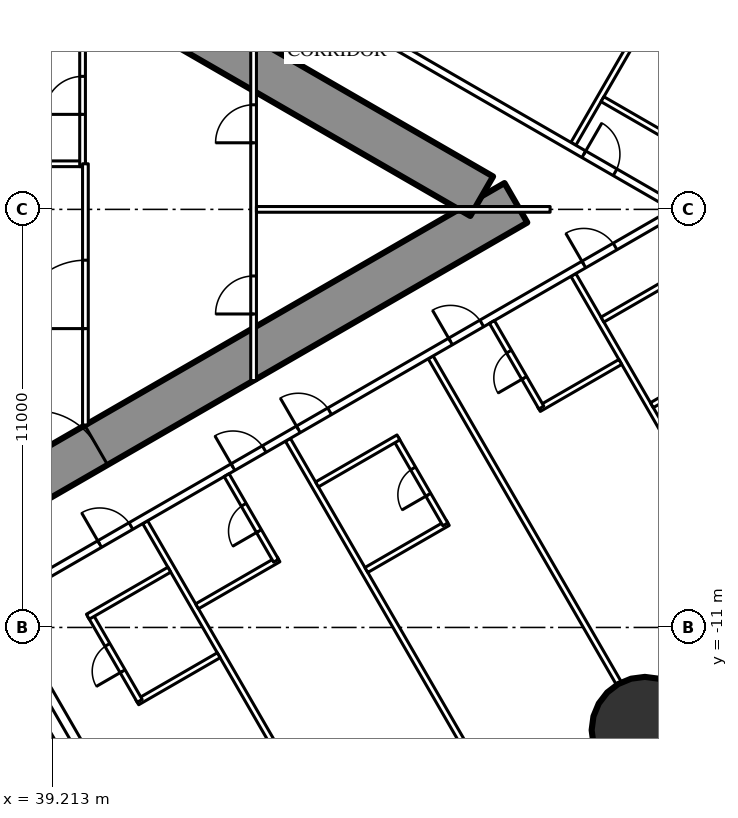
"""IFC4 building model, lengths in metres.
Left out: names, types, materials, properties, quantities, classifications, styles, units other than length and angle.
Written with IfcOpenShell. Run it as: python <this file> out.ifc"""

import sys

from ifc_helpers import new_model, si_unit, direction, frame, frame_2d, origin, origin_2d, place, context, subcontext, project, spatial, rectangle, hollow_circle, extrude, element, fill, save


model = new_model("IFC4")
c1 = context("Model", 3, precision=1e-05, world=origin(), true_north=direction((0.0, 1.0)))
c2 = subcontext(c1, "Body", "Model", "MODEL_VIEW")
j1 = project(units=[si_unit("LENGTHUNIT", "METRE"), si_unit("PLANEANGLEUNIT", "RADIAN")], contexts=[c1])
p1 = place(None, origin())
s1 = spatial("IfcSite", under=j1, at=p1, CompositionType="ELEMENT")
p2 = place(p1, origin())
s2 = spatial("IfcBuilding", under=s1, at=p2, CompositionType="ELEMENT")
p3 = place(p2, frame((0.0, 0.0, 63.5)))
s3 = spatial("IfcBuildingStorey", under=s2, at=p3, CompositionType="ELEMENT", Elevation=63.5)
p4 = place(p3, frame((54.795, -13.701, 0.0), z_axis=(0.0, 0.0, 1.0), x_axis=(1.0, 0.0, 0.0)))
e1 = element("IfcColumn", 1, at=p4, inside=s3, PredefinedType="COLUMN", context=c2, shape_type="SweptSolid", body=[
    extrude(hollow_circle(Radius=1.4, WallThickness=0.12, at=origin_2d()), origin(), (0.0, 0.0, 1.0), 3.5),
])
p5 = place(p3, frame((27.2, -13.8, 0.0), z_axis=(0.0, 0.0, 1.0), x_axis=(0.866027159892, 0.499996958321, 0.0)))
e2 = element("IfcWall", 2, at=p5, inside=s3, PredefinedType="SHEAR", context=c2, shape_type="SweptSolid", body=[
    extrude(rectangle(XDim=27.947, YDim=1.2, at=frame_2d((13.973, 0.0))), origin(), (0.0, 0.0, 1.0), 3.5),
])
p6 = place(p5, frame((4.6, 0.0, 0.0)))
e3 = element("IfcOpeningElement", 3, at=p6, cuts=e2, PredefinedType="OPENING", context=c2, shape_type="SweptSolid", body=[
    extrude(rectangle(XDim=1.0, YDim=2.2, at=frame_2d((0.5, 1.1))), frame((0.0, 0.61, 0.0), z_axis=(0.0, -1.0, 0.0), x_axis=(1.0, 0.0, 0.0)), (0.0, 0.0, 1.0), 1.22),
])
p7 = place(p5, frame((13.395, 0.0, 0.0)))
e4 = element("IfcOpeningElement", 4, at=p7, cuts=e2, PredefinedType="OPENING", context=c2, shape_type="SweptSolid", body=[
    extrude(rectangle(XDim=1.8, YDim=2.2, at=frame_2d((0.9, 1.1))), frame((0.0, 0.61, 0.0), z_axis=(0.0, -1.0, 0.0), x_axis=(1.0, 0.0, 0.0)), (0.0, 0.0, 1.0), 1.22),
])
p8 = place(p3, frame((27.2, 13.8, 0.0), z_axis=(0.0, 0.0, 1.0), x_axis=(0.866024515034, -0.500001539357, 0.0)))
e5 = element("IfcWall", 5, at=p8, inside=s3, PredefinedType="SHEAR", context=c2, shape_type="SweptSolid", body=[
    extrude(rectangle(XDim=26.907, YDim=1.2, at=frame_2d((13.454, 0.0))), origin(), (0.0, 0.0, 1.0), 3.5),
])
p9 = place(p8, frame((4.6, 0.0, 0.0)))
e6 = element("IfcOpeningElement", 6, at=p9, cuts=e5, PredefinedType="OPENING", context=c2, shape_type="SweptSolid", body=[
    extrude(rectangle(XDim=1.0, YDim=2.2, at=frame_2d((0.5, 1.1))), frame((0.0, 0.61, 0.0), z_axis=(0.0, -1.0, 0.0), x_axis=(1.0, 0.0, 0.0)), (0.0, 0.0, 1.0), 1.22),
])
p10 = place(p8, frame((13.395, 0.0, 0.0)))
e7 = element("IfcOpeningElement", 7, at=p10, cuts=e5, PredefinedType="OPENING", context=c2, shape_type="SweptSolid", body=[
    extrude(rectangle(XDim=1.8, YDim=2.2, at=frame_2d((0.9, 1.1))), frame((0.0, 0.61, 0.0), z_axis=(0.0, -1.0, 0.0), x_axis=(1.0, 0.0, 0.0)), (0.0, 0.0, 1.0), 1.22),
])
p11 = place(p3, frame((41.647, -8.23, 0.0), z_axis=(0.0, 0.0, 1.0), x_axis=(0.49998590462, -0.866033541603, 0.0)))
e8 = element("IfcWall", 8, at=p11, inside=s3, PredefinedType="PARTITIONING", context=c2, shape_type="SweptSolid", body=[
    extrude(rectangle(XDim=12.621, YDim=0.15, at=frame_2d((6.311, 0.0))), origin(), (0.0, 0.0, 1.0), 3.25),
])
p12 = place(p3, frame((45.403, -6.062, 0.0), z_axis=(0.0, 0.0, 1.0), x_axis=(0.500007077968, -0.866021317279, 0.0)))
e9 = element("IfcWall", 9, at=p12, inside=s3, PredefinedType="PARTITIONING", context=c2, shape_type="SweptSolid", body=[
    extrude(rectangle(XDim=12.721, YDim=0.15, at=frame_2d((6.361, 0.0))), origin(), (0.0, 0.0, 1.0), 3.25),
])
p13 = place(p3, frame((49.159, -3.893, 0.0), z_axis=(0.0, 0.0, 1.0), x_axis=(0.499998773722, -0.866026111775, 0.0)))
e10 = element("IfcWall", 10, at=p13, inside=s3, PredefinedType="PARTITIONING", context=c2, shape_type="SweptSolid", body=[
    extrude(rectangle(XDim=9.892, YDim=0.15, at=frame_2d((4.946, 0.0))), origin(), (0.0, 0.0, 1.0), 2.25),
])
for number, where, z_axis, x_axis in (
    (11, (52.915, -1.725, 0.0), (0.0, 0.0, 1.0), (0.5, -0.866, 0.0)),
    (12, (52.915, 1.725, 0.0), (0.0, 0.0, 1.0), (0.5, 0.866, 0.0)),
):
    element("IfcWall", number, at=place(p3, frame(where, z_axis=z_axis, x_axis=x_axis)), inside=s3, PredefinedType="PARTITIONING", context=c2, shape_type="SweptSolid", body=[
        extrude(rectangle(XDim=12.591, YDim=0.15, at=frame_2d((6.295, 0.0))), origin(), (0.0, 0.0, 1.0), 3.25),
    ])
p14 = place(p3, frame((37.96, -10.243, 0.0), z_axis=(0.0, 0.0, 1.0), x_axis=(0.866026429433, 0.499998223521, 0.0)))
e13 = element("IfcWall", 13, at=p14, inside=s3, PredefinedType="PARTITIONING", context=c2, shape_type="SweptSolid", body=[
    extrude(rectangle(XDim=20.487, YDim=0.2, at=frame_2d((10.243, 0.0))), origin(), (0.0, 0.0, 1.0), 3.25),
])
p15 = place(p14, frame((6.925, 0.0, 0.0)))
e14 = element("IfcOpeningElement", 14, at=p15, cuts=e13, PredefinedType="OPENING", context=c2, shape_type="SweptSolid", body=[
    extrude(rectangle(XDim=0.95, YDim=2.2, at=frame_2d((0.475, 1.1))), frame((0.0, 0.11, 0.0), z_axis=(0.0, -1.0, 0.0), x_axis=(1.0, 0.0, 0.0)), (0.0, 0.0, 1.0), 0.22),
])
p16 = place(p14, frame((8.912, 0.0, 0.0)))
e15 = element("IfcOpeningElement", 15, at=p16, cuts=e13, PredefinedType="OPENING", context=c2, shape_type="SweptSolid", body=[
    extrude(rectangle(XDim=0.95, YDim=2.2, at=frame_2d((0.475, 1.1))), frame((0.0, 0.11, 0.0), z_axis=(0.0, -1.0, 0.0), x_axis=(1.0, 0.0, 0.0)), (0.0, 0.0, 1.0), 0.22),
])
p17 = place(p14, frame((13.535, 0.0, 0.0)))
e16 = element("IfcOpeningElement", 16, at=p17, cuts=e13, PredefinedType="OPENING", context=c2, shape_type="SweptSolid", body=[
    extrude(rectangle(XDim=0.95, YDim=2.2, at=frame_2d((0.475, 1.1))), frame((0.0, 0.11, 0.0), z_axis=(0.0, -1.0, 0.0), x_axis=(1.0, 0.0, 0.0)), (0.0, 0.0, 1.0), 0.22),
])
p18 = place(p14, frame((17.585, 0.0, 0.0)))
e17 = element("IfcOpeningElement", 17, at=p18, cuts=e13, PredefinedType="OPENING", context=c2, shape_type="SweptSolid", body=[
    extrude(rectangle(XDim=0.95, YDim=2.2, at=frame_2d((0.475, 1.1))), frame((0.0, 0.11, 0.0), z_axis=(0.0, -1.0, 0.0), x_axis=(1.0, 0.0, 0.0)), (0.0, 0.0, 1.0), 0.22),
])
p19 = place(p14, frame((2.875, 0.0, 0.0)))
e18 = element("IfcOpeningElement", 18, at=p19, cuts=e13, PredefinedType="OPENING", context=c2, shape_type="SweptSolid", body=[
    extrude(rectangle(XDim=0.95, YDim=2.2, at=frame_2d((0.475, 1.1))), frame((0.0, 0.11, 0.0), z_axis=(0.0, -1.0, 0.0), x_axis=(1.0, 0.0, 0.0)), (0.0, 0.0, 1.0), 0.22),
])
p20 = place(p3, frame((41.619, 8.131, 0.0), z_axis=(0.0, 0.0, 1.0), x_axis=(0.86603245327, -0.499987789734, 0.0)))
e19 = element("IfcWall", 19, at=p20, inside=s3, PredefinedType="PARTITIONING", context=c2, shape_type="SweptSolid", body=[
    extrude(rectangle(XDim=16.142, YDim=0.2, at=frame_2d((8.071, 0.0))), origin(), (0.0, 0.0, 1.0), 3.25),
])
p21 = place(p20, frame((13.36, 0.0, 0.0)))
e20 = element("IfcOpeningElement", 20, at=p21, cuts=e19, PredefinedType="OPENING", context=c2, shape_type="SweptSolid", body=[
    extrude(rectangle(XDim=0.95, YDim=2.2, at=frame_2d((0.475, 1.1))), frame((0.0, 0.11, 0.0), z_axis=(0.0, -1.0, 0.0), x_axis=(1.0, 0.0, 0.0)), (0.0, 0.0, 1.0), 0.22),
])
p22 = place(p20, frame((4.687, 0.0, 0.0)))
e21 = element("IfcOpeningElement", 21, at=p22, cuts=e19, PredefinedType="OPENING", context=c2, shape_type="SweptSolid", body=[
    extrude(rectangle(XDim=0.95, YDim=2.2, at=frame_2d((0.475, 1.1))), frame((0.0, 0.11, 0.0), z_axis=(0.0, -1.0, 0.0), x_axis=(1.0, 0.0, 0.0)), (0.0, 0.0, 1.0), 0.22),
])
p23 = place(p20, frame((2.987, 0.0, 0.0)))
e22 = element("IfcOpeningElement", 22, at=p23, cuts=e19, PredefinedType="OPENING", context=c2, shape_type="SweptSolid", body=[
    extrude(rectangle(XDim=0.95, YDim=2.2, at=frame_2d((0.475, 1.1))), frame((0.0, 0.11, 0.0), z_axis=(0.0, -1.0, 0.0), x_axis=(1.0, 0.0, 0.0)), (0.0, 0.0, 1.0), 0.22),
])
p24 = place(p3, frame((43.012, -10.444, 0.0), z_axis=(0.0, 0.0, 1.0), x_axis=(0.866031185235, 0.4999899861, 0.0)))
e23 = element("IfcWall", 23, at=p24, inside=s3, PredefinedType="PARTITIONING", context=c2, shape_type="SweptSolid", body=[
    extrude(rectangle(XDim=2.475, YDim=0.15, at=frame_2d((1.238, 0.0))), origin(), (0.0, 0.0, 1.0), 3.25),
])
p25 = place(p3, frame((43.791, -6.993, 0.0), z_axis=(0.0, 0.0, 1.0), x_axis=(0.500047596559, -0.865997922154, 0.0)))
e24 = element("IfcWall", 24, at=p25, inside=s3, PredefinedType="PARTITIONING", context=c2, shape_type="SweptSolid", body=[
    extrude(rectangle(XDim=2.6, YDim=0.15, at=frame_2d((1.3, 0.0))), origin(), (0.0, 0.0, 1.0), 3.25),
])
p26 = place(p25, frame((0.9, 0.0, 0.0)))
e25 = element("IfcOpeningElement", 25, at=p26, cuts=e24, PredefinedType="OPENING", context=c2, shape_type="SweptSolid", body=[
    extrude(rectangle(XDim=0.8, YDim=2.2, at=frame_2d((0.4, 1.1))), frame((0.0, 0.085, 0.0), z_axis=(0.0, -1.0, 0.0), x_axis=(1.0, 0.0, 0.0)), (0.0, 0.0, 1.0), 0.17),
])
p27 = place(p3, frame((47.468, -9.488, 0.0), z_axis=(0.0, 0.0, 1.0), x_axis=(0.86604923931, 0.499958713387, 0.0)))
e26 = element("IfcWall", 26, at=p27, inside=s3, PredefinedType="PARTITIONING", context=c2, shape_type="SweptSolid", body=[
    extrude(rectangle(XDim=2.475, YDim=0.15, at=frame_2d((1.237, 0.0))), origin(), (0.0, 0.0, 1.0), 3.25),
])
p28 = place(p3, frame((48.246, -6.037, 0.0), z_axis=(0.0, 0.0, 1.0), x_axis=(0.500006934395, -0.866021400173, 0.0)))
e27 = element("IfcWall", 27, at=p28, inside=s3, PredefinedType="PARTITIONING", context=c2, shape_type="SweptSolid", body=[
    extrude(rectangle(XDim=2.6, YDim=0.15, at=frame_2d((1.3, 0.0))), origin(), (0.0, 0.0, 1.0), 3.25),
])
p29 = place(p28, frame((0.9, 0.0, 0.0)))
e28 = element("IfcOpeningElement", 28, at=p29, cuts=e27, PredefinedType="OPENING", context=c2, shape_type="SweptSolid", body=[
    extrude(rectangle(XDim=0.8, YDim=2.2, at=frame_2d((0.4, 1.1))), frame((0.0, 0.085, 0.0), z_axis=(0.0, -1.0, 0.0), x_axis=(1.0, 0.0, 0.0)), (0.0, 0.0, 1.0), 0.17),
])
for number, where, z_axis, x_axis in (
    (29, (46.168, -7.237, 0.0), (0.0, 0.0, 1.0), (0.866, 0.5, 0.0)),
    (30, (52.006, -5.251, 0.0), (0.0, 0.0, 1.0), (0.866, 0.5, 0.0)),
):
    element("IfcWall", number, at=place(p3, frame(where, z_axis=z_axis, x_axis=x_axis)), inside=s3, PredefinedType="PARTITIONING", context=c2, shape_type="SweptSolid", body=[
        extrude(rectangle(XDim=2.475, YDim=0.15, at=frame_2d((1.237, 0.0))), origin(), (0.0, 0.0, 1.0), 3.25),
    ])
p30 = place(p3, frame((50.771, -2.962, 0.0), z_axis=(0.0, 0.0, 1.0), x_axis=(0.500006934395, -0.866021400173, 0.0)))
e31 = element("IfcWall", 31, at=p30, inside=s3, PredefinedType="PARTITIONING", context=c2, shape_type="SweptSolid", body=[
    extrude(rectangle(XDim=2.6, YDim=0.15, at=frame_2d((1.3, 0.0))), origin(), (0.0, 0.0, 1.0), 3.25),
])
p31 = place(p30, frame((0.9, 0.0, 0.0)))
e32 = element("IfcOpeningElement", 32, at=p31, cuts=e31, PredefinedType="OPENING", context=c2, shape_type="SweptSolid", body=[
    extrude(rectangle(XDim=0.8, YDim=2.2, at=frame_2d((0.4, 1.1))), frame((0.0, 0.085, 0.0), z_axis=(0.0, -1.0, 0.0), x_axis=(1.0, 0.0, 0.0)), (0.0, 0.0, 1.0), 0.17),
])
for number, where, z_axis, x_axis in (
    (33, (54.98, -5.151, 0.0), (0.0, 0.0, 1.0), (0.866, 0.5, 0.0)),
    (34, (53.68, -2.9, 0.0), (0.0, 0.0, 1.0), (0.866, 0.5, 0.0)),
    (35, (54.98, 5.151, 0.0), (0.0, 0.0, 1.0), (0.866, -0.5, 0.0)),
    (36, (53.68, 2.9, 0.0), (0.0, 0.0, 1.0), (0.866, -0.5, 0.0)),
):
    element("IfcWall", number, at=place(p3, frame(where, z_axis=z_axis, x_axis=x_axis)), inside=s3, PredefinedType="PARTITIONING", context=c2, shape_type="SweptSolid", body=[
        extrude(rectangle(XDim=2.475, YDim=0.15, at=frame_2d((1.237, 0.0))), origin(), (0.0, 0.0, 1.0), 3.25),
    ])
p32 = place(p3, frame((41.439, -12.969, 0.0), z_axis=(0.0, 0.0, 1.0), x_axis=(0.866031185235, 0.4999899861, 0.0)))
e37 = element("IfcWall", 37, at=p32, inside=s3, PredefinedType="PARTITIONING", context=c2, shape_type="SweptSolid", body=[
    extrude(rectangle(XDim=2.475, YDim=0.15, at=frame_2d((1.238, 0.0))), origin(), (0.0, 0.0, 1.0), 3.25),
])
p33 = place(p3, frame((40.204, -10.68, 0.0), z_axis=(0.0, 0.0, 1.0), x_axis=(0.500006934395, -0.866021400173, 0.0)))
e38 = element("IfcWall", 38, at=p33, inside=s3, PredefinedType="PARTITIONING", context=c2, shape_type="SweptSolid", body=[
    extrude(rectangle(XDim=2.6, YDim=0.15, at=frame_2d((1.3, 0.0))), origin(), (0.0, 0.0, 1.0), 3.25),
])
p34 = place(p33, frame((0.9, 0.0, 0.0)))
e39 = element("IfcOpeningElement", 39, at=p34, cuts=e38, PredefinedType="OPENING", context=c2, shape_type="SweptSolid", body=[
    extrude(rectangle(XDim=0.8, YDim=2.2, at=frame_2d((0.4, 1.1))), frame((0.0, 0.085, 0.0), z_axis=(0.0, -1.0, 0.0), x_axis=(1.0, 0.0, 0.0)), (0.0, 0.0, 1.0), 0.17),
])
p35 = place(p3, frame((40.139, -10.718, 0.0), z_axis=(0.0, 0.0, 1.0), x_axis=(0.866031185235, 0.4999899861, 0.0)))
e40 = element("IfcWall", 40, at=p35, inside=s3, PredefinedType="PARTITIONING", context=c2, shape_type="SweptSolid", body=[
    extrude(rectangle(XDim=2.475, YDim=0.15, at=frame_2d((1.238, 0.0))), origin(), (0.0, 0.0, 1.0), 3.25),
])
p36 = place(p3, frame((37.9, 1.2, 0.0), z_axis=(0.0, 0.0, 1.0), x_axis=(1.0, 0.0, 0.0)))
e41 = element("IfcWall", 41, at=p36, inside=s3, PredefinedType="PARTITIONING", context=c2, shape_type="SweptSolid", body=[
    extrude(rectangle(XDim=2.175, YDim=0.15, at=frame_2d((1.087, 0.0))), origin(), (0.0, 0.0, 1.0), 3.25),
])
p37 = place(p3, frame((40.0, 1.125, 0.0), z_axis=(0.0, 0.0, 1.0), x_axis=(0.0, 1.0, 0.0)))
e42 = element("IfcWall", 42, at=p37, inside=s3, PredefinedType="PARTITIONING", context=c2, shape_type="SweptSolid", body=[
    extrude(rectangle(XDim=3.75, YDim=0.15, at=frame_2d((1.875, 0.0))), origin(), (0.0, 0.0, 1.0), 3.25),
])
p38 = place(p37, frame((1.375, 0.0, 0.0)))
e43 = element("IfcOpeningElement", 43, at=p38, cuts=e42, PredefinedType="OPENING", context=c2, shape_type="SweptSolid", body=[
    extrude(rectangle(XDim=1.0, YDim=2.2, at=frame_2d((0.5, 1.1))), frame((0.0, 0.085, 0.0), z_axis=(0.0, -1.0, 0.0), x_axis=(1.0, 0.0, 0.0)), (0.0, 0.0, 1.0), 0.17),
])
p39 = place(p3, frame((40.075, -5.674, 0.0), z_axis=(0.0, 0.0, 1.0), x_axis=(0.0, 1.0, 0.0)))
e44 = element("IfcWall", 44, at=p39, inside=s3, PredefinedType="PARTITIONING", context=c2, shape_type="SweptSolid", body=[
    extrude(rectangle(XDim=6.874, YDim=0.15, at=frame_2d((3.437, 0.0))), origin(), (0.0, 0.0, 1.0), 3.25),
])
p40 = place(p39, frame((2.537, 0.0, 0.0)))
e45 = element("IfcOpeningElement", 45, at=p40, cuts=e44, PredefinedType="OPENING", context=c2, shape_type="SweptSolid", body=[
    extrude(rectangle(XDim=1.8, YDim=2.2, at=frame_2d((0.9, 1.1))), frame((0.0, 0.085, 0.0), z_axis=(0.0, -1.0, 0.0), x_axis=(1.0, 0.0, 0.0)), (0.0, 0.0, 1.0), 0.17),
])
p41 = place(p3, frame((44.5, -4.505, 0.0), z_axis=(0.0, 0.0, 1.0), x_axis=(0.0, 1.0, 0.0)))
e46 = element("IfcWall", 46, at=p41, inside=s3, PredefinedType="PARTITIONING", context=c2, shape_type="SweptSolid", body=[
    extrude(rectangle(XDim=9.009, YDim=0.15, at=frame_2d((4.505, 0.0))), origin(), (0.0, 0.0, 1.0), 2.45),
])
p42 = place(p41, frame((1.752, 0.0, 0.0)))
e47 = element("IfcOpeningElement", 47, at=p42, cuts=e46, PredefinedType="OPENING", context=c2, shape_type="SweptSolid", body=[
    extrude(rectangle(XDim=1.0, YDim=2.2, at=frame_2d((0.5, 1.1))), frame((0.0, 0.085, 0.0), z_axis=(0.0, -1.0, 0.0), x_axis=(1.0, 0.0, 0.0)), (0.0, 0.0, 1.0), 0.17),
])
p43 = place(p41, frame((6.257, 0.0, 0.0)))
e48 = element("IfcOpeningElement", 48, at=p43, cuts=e46, PredefinedType="OPENING", context=c2, shape_type="SweptSolid", body=[
    extrude(rectangle(XDim=1.0, YDim=2.2, at=frame_2d((0.5, 1.1))), frame((0.0, 0.085, 0.0), z_axis=(0.0, -1.0, 0.0), x_axis=(1.0, 0.0, 0.0)), (0.0, 0.0, 1.0), 0.17),
])
p44 = place(p3, frame((44.575, 0.0, 0.0), z_axis=(0.0, 0.0, 1.0), x_axis=(1.0, 0.0, 0.0)))
e49 = element("IfcWall", 49, at=p44, inside=s3, PredefinedType="PARTITIONING", context=c2, shape_type="SweptSolid", body=[
    extrude(rectangle(XDim=7.727, YDim=0.15, at=frame_2d((3.864, 0.0))), origin(), (0.0, 0.0, 1.0), 2.25),
])
p45 = place(p3, frame((38.673, -11.968, 0.0), z_axis=(0.0, 0.0, 1.0), x_axis=(0.499929347863, -0.866066190972, 0.0)))
e50 = element("IfcWall", 50, at=p45, inside=s3, PredefinedType="PARTITIONING", context=c2, shape_type="SweptSolid", body=[
    extrude(rectangle(XDim=3.201, YDim=0.25, at=frame_2d((1.6, 0.0))), origin(), (0.0, 0.0, 1.0), 3.25),
])
p46 = place(p26, origin())
e51 = element("IfcDoor", 51, at=p46, inside=s3, OperationType="SINGLE_SWING_RIGHT", PredefinedType="DOOR", context=c2, shape_type="SweptSolid", body=[
    extrude(rectangle(XDim=0.8, YDim=2.2, at=frame_2d((0.4, 1.1))), frame((0.0, 0.025, 0.0), z_axis=(0.0, -1.0, 0.0), x_axis=(1.0, 0.0, 0.0)), (0.0, 0.0, 1.0), 0.05),
])
fill(e25, e51)
p47 = place(p15, origin())
e52 = element("IfcDoor", 52, at=p47, inside=s3, OperationType="SINGLE_SWING_LEFT", PredefinedType="DOOR", context=c2, shape_type="SweptSolid", body=[
    extrude(rectangle(XDim=0.95, YDim=2.2, at=frame_2d((0.475, 1.1))), frame((0.0, 0.025, 0.0), z_axis=(0.0, -1.0, 0.0), x_axis=(1.0, 0.0, 0.0)), (0.0, 0.0, 1.0), 0.05),
])
fill(e14, e52)
p48 = place(p29, origin())
e53 = element("IfcDoor", 53, at=p48, inside=s3, OperationType="SINGLE_SWING_RIGHT", PredefinedType="DOOR", context=c2, shape_type="SweptSolid", body=[
    extrude(rectangle(XDim=0.8, YDim=2.2, at=frame_2d((0.4, 1.1))), frame((0.0, 0.025, 0.0), z_axis=(0.0, -1.0, 0.0), x_axis=(1.0, 0.0, 0.0)), (0.0, 0.0, 1.0), 0.05),
])
fill(e28, e53)
p49 = place(p16, origin())
e54 = element("IfcDoor", 54, at=p49, inside=s3, OperationType="SINGLE_SWING_LEFT", PredefinedType="DOOR", context=c2, shape_type="SweptSolid", body=[
    extrude(rectangle(XDim=0.95, YDim=2.2, at=frame_2d((0.475, 1.1))), frame((0.0, 0.025, 0.0), z_axis=(0.0, -1.0, 0.0), x_axis=(1.0, 0.0, 0.0)), (0.0, 0.0, 1.0), 0.05),
])
fill(e15, e54)
p50 = place(p31, origin())
e55 = element("IfcDoor", 55, at=p50, inside=s3, OperationType="SINGLE_SWING_RIGHT", PredefinedType="DOOR", context=c2, shape_type="SweptSolid", body=[
    extrude(rectangle(XDim=0.8, YDim=2.2, at=frame_2d((0.4, 1.1))), frame((0.0, 0.025, 0.0), z_axis=(0.0, -1.0, 0.0), x_axis=(1.0, 0.0, 0.0)), (0.0, 0.0, 1.0), 0.05),
])
fill(e32, e55)
p51 = place(p17, origin())
e56 = element("IfcDoor", 56, at=p51, inside=s3, OperationType="SINGLE_SWING_LEFT", PredefinedType="DOOR", context=c2, shape_type="SweptSolid", body=[
    extrude(rectangle(XDim=0.95, YDim=2.2, at=frame_2d((0.475, 1.1))), frame((0.0, 0.025, 0.0), z_axis=(0.0, -1.0, 0.0), x_axis=(1.0, 0.0, 0.0)), (0.0, 0.0, 1.0), 0.05),
])
fill(e16, e56)
p52 = place(p18, origin())
e57 = element("IfcDoor", 57, at=p52, inside=s3, OperationType="SINGLE_SWING_LEFT", PredefinedType="DOOR", context=c2, shape_type="SweptSolid", body=[
    extrude(rectangle(XDim=0.95, YDim=2.2, at=frame_2d((0.475, 1.1))), frame((0.0, 0.025, 0.0), z_axis=(0.0, -1.0, 0.0), x_axis=(1.0, 0.0, 0.0)), (0.0, 0.0, 1.0), 0.05),
])
fill(e17, e57)
p53 = place(p21, origin())
e58 = element("IfcDoor", 58, at=p53, inside=s3, OperationType="SINGLE_SWING_LEFT", PredefinedType="DOOR", context=c2, shape_type="SweptSolid", body=[
    extrude(rectangle(XDim=0.95, YDim=2.2, at=frame_2d((0.475, 1.1))), frame((0.0, 0.025, 0.0), z_axis=(0.0, -1.0, 0.0), x_axis=(1.0, 0.0, 0.0)), (0.0, 0.0, 1.0), 0.05),
])
fill(e20, e58)
p54 = place(p34, origin())
e59 = element("IfcDoor", 59, at=p54, inside=s3, OperationType="SINGLE_SWING_RIGHT", PredefinedType="DOOR", context=c2, shape_type="SweptSolid", body=[
    extrude(rectangle(XDim=0.8, YDim=2.2, at=frame_2d((0.4, 1.1))), frame((0.0, 0.025, 0.0), z_axis=(0.0, -1.0, 0.0), x_axis=(1.0, 0.0, 0.0)), (0.0, 0.0, 1.0), 0.05),
])
fill(e39, e59)
p55 = place(p19, origin())
e60 = element("IfcDoor", 60, at=p55, inside=s3, OperationType="SINGLE_SWING_LEFT", PredefinedType="DOOR", context=c2, shape_type="SweptSolid", body=[
    extrude(rectangle(XDim=0.95, YDim=2.2, at=frame_2d((0.475, 1.1))), frame((0.0, 0.025, 0.0), z_axis=(0.0, -1.0, 0.0), x_axis=(1.0, 0.0, 0.0)), (0.0, 0.0, 1.0), 0.05),
])
fill(e18, e60)
p56 = place(p38, origin())
e61 = element("IfcDoor", 61, at=p56, inside=s3, OperationType="SINGLE_SWING_LEFT", PredefinedType="DOOR", context=c2, shape_type="SweptSolid", body=[
    extrude(rectangle(XDim=1.0, YDim=2.2, at=frame_2d((0.5, 1.1))), frame((0.0, 0.025, 0.0), z_axis=(0.0, -1.0, 0.0), x_axis=(1.0, 0.0, 0.0)), (0.0, 0.0, 1.0), 0.05),
])
fill(e43, e61)
p57 = place(p40, origin())
e62 = element("IfcDoor", 62, at=p57, inside=s3, OperationType="DOUBLE_DOOR_SINGLE_SWING", PredefinedType="DOOR", context=c2, shape_type="SweptSolid", body=[
    extrude(rectangle(XDim=1.8, YDim=2.2, at=frame_2d((0.9, 1.1))), frame((0.0, 0.025, 0.0), z_axis=(0.0, -1.0, 0.0), x_axis=(1.0, 0.0, 0.0)), (0.0, 0.0, 1.0), 0.05),
])
fill(e45, e62)
p58 = place(p42, origin())
e63 = element("IfcDoor", 63, at=p58, inside=s3, OperationType="SINGLE_SWING_LEFT", PredefinedType="DOOR", context=c2, shape_type="SweptSolid", body=[
    extrude(rectangle(XDim=1.0, YDim=2.2, at=frame_2d((0.5, 1.1))), frame((0.0, 0.025, 0.0), z_axis=(0.0, -1.0, 0.0), x_axis=(1.0, 0.0, 0.0)), (0.0, 0.0, 1.0), 0.05),
])
fill(e47, e63)
p59 = place(p43, origin())
e64 = element("IfcDoor", 64, at=p59, inside=s3, OperationType="SINGLE_SWING_LEFT", PredefinedType="DOOR", context=c2, shape_type="SweptSolid", body=[
    extrude(rectangle(XDim=1.0, YDim=2.2, at=frame_2d((0.5, 1.1))), frame((0.0, 0.025, 0.0), z_axis=(0.0, -1.0, 0.0), x_axis=(1.0, 0.0, 0.0)), (0.0, 0.0, 1.0), 0.05),
])
fill(e48, e64)
p60 = place(p7, origin())
e65 = element("IfcDoor", 65, at=p60, inside=s3, OperationType="DOUBLE_DOOR_SINGLE_SWING", PredefinedType="DOOR", context=c2, shape_type="SweptSolid", body=[
    extrude(rectangle(XDim=1.8, YDim=2.2, at=frame_2d((0.9, 1.1))), frame((0.0, 0.025, 0.0), z_axis=(0.0, -1.0, 0.0), x_axis=(1.0, 0.0, 0.0)), (0.0, 0.0, 1.0), 0.05),
])
fill(e4, e65)
save(model, sys.argv[1])
